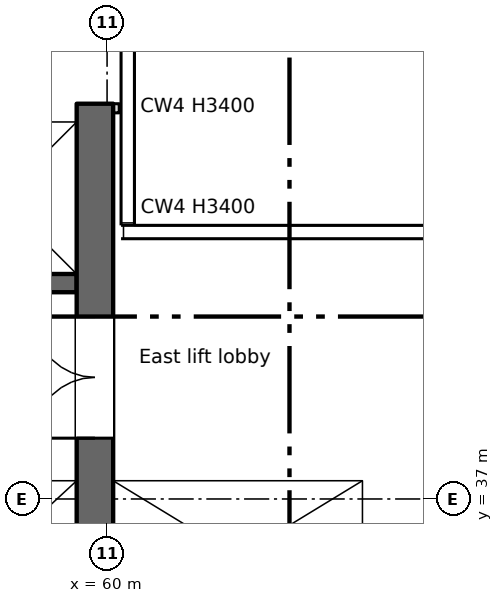
"""IFC4 building model, lengths in metres.
Left out: names, types, materials, properties, quantities, classifications, styles, units other than length and angle.
Written with IfcOpenShell. Run it as: python <this file> out.ifc"""

import sys

from ifc_helpers import new_model, si_unit, direction, frame, frame_2d, origin, place, context, subcontext, project, spatial, rectangle, extrude, element, fill, save


model = new_model("IFC4")
c1 = context("Model", 3, precision=1e-05, world=origin(), true_north=direction((0.0, 1.0)))
c2 = subcontext(c1, "Body", "Model", "MODEL_VIEW")
j1 = project(units=[si_unit("LENGTHUNIT", "METRE"), si_unit("PLANEANGLEUNIT", "RADIAN")], contexts=[c1])
p1 = place(None, origin())
s1 = spatial("IfcSite", under=j1, at=p1, CompositionType="ELEMENT")
p2 = place(p1, origin())
s2 = spatial("IfcBuilding", under=s1, at=p2, CompositionType="ELEMENT")
p3 = place(p2, frame((0.0, 0.0, 258.35)))
s3 = spatial("IfcBuildingStorey", under=s2, at=p3, CompositionType="ELEMENT", Elevation=258.35)
p4 = place(p3, frame((64.35, 34.8, 0.0), z_axis=(0.0, 0.0, 1.0), x_axis=(0.0, 1.0, 0.0)))
e1 = element("IfcWall", 1, at=p4, inside=s3, PredefinedType="SHEAR", context=c2, shape_type="SweptSolid", body=[
    extrude(rectangle(XDim=6.45, YDim=0.3, at=frame_2d((3.225, 0.0))), origin(), (0.0, 0.0, 1.0), 3.4),
])
p5 = place(p3, frame((59.8, 28.4, 0.0), z_axis=(0.0, 0.0, 1.0), x_axis=(0.0, 1.0, 0.0)))
e2 = element("IfcWall", 2, at=p5, inside=s3, PredefinedType="SHEAR", context=c2, shape_type="SweptSolid", body=[
    extrude(rectangle(XDim=15.1, YDim=0.6, at=frame_2d((7.55, 0.0))), origin(), (0.0, 0.0, 1.0), 3.4),
])
p6 = place(p5, frame((9.6, 0.0, 0.0)))
e3 = element("IfcOpeningElement", 3, at=p6, cuts=e2, PredefinedType="OPENING", context=c2, shape_type="SweptSolid", body=[
    extrude(rectangle(XDim=2.0, YDim=2.1, at=frame_2d((1.0, 1.05))), frame((0.0, 0.31, 0.0), z_axis=(0.0, -1.0, 0.0), x_axis=(1.0, 0.0, 0.0)), (0.0, 0.0, 1.0), 0.62),
])
p7 = place(p3, frame((47.3, 37.45, 0.0), z_axis=(0.0, 0.0, 1.0), x_axis=(1.0, 0.0, 0.0)))
e4 = element("IfcWall", 4, at=p7, inside=s3, PredefinedType="SHEAR", context=c2, shape_type="SweptSolid", body=[
    extrude(rectangle(XDim=12.2, YDim=0.3, at=frame_2d((6.1, 0.0))), origin(), (0.0, 0.0, 1.0), 3.4),
])
p8 = place(p7, frame((4.3, 0.0, 0.0)))
e5 = element("IfcOpeningElement", 5, at=p8, cuts=e4, PredefinedType="OPENING", context=c2, shape_type="SweptSolid", body=[
    extrude(rectangle(XDim=1.1, YDim=2.1, at=frame_2d((0.55, 1.05))), frame((0.0, 0.16, 0.0), z_axis=(0.0, -1.0, 0.0), x_axis=(1.0, 0.0, 0.0)), (0.0, 0.0, 1.0), 0.32),
])
p9 = place(p7, frame((7.3, 0.0, 0.0)))
e6 = element("IfcOpeningElement", 6, at=p9, cuts=e4, PredefinedType="OPENING", context=c2, shape_type="SweptSolid", body=[
    extrude(rectangle(XDim=1.1, YDim=2.1, at=frame_2d((0.55, 1.05))), frame((0.0, 0.16, 0.0), z_axis=(0.0, -1.0, 0.0), x_axis=(1.0, 0.0, 0.0)), (0.0, 0.0, 1.0), 0.32),
])
p10 = place(p7, frame((10.3, 0.0, 0.0)))
e7 = element("IfcOpeningElement", 7, at=p10, cuts=e4, PredefinedType="OPENING", context=c2, shape_type="SweptSolid", body=[
    extrude(rectangle(XDim=1.1, YDim=2.1, at=frame_2d((0.55, 1.05))), frame((0.0, 0.16, 0.0), z_axis=(0.0, -1.0, 0.0), x_axis=(1.0, 0.0, 0.0)), (0.0, 0.0, 1.0), 0.32),
])
p11 = place(p3, frame((60.1, 37.45, 0.0), z_axis=(0.0, 0.0, 1.0), x_axis=(1.0, 0.0, 0.0)))
e8 = element("IfcWall", 8, at=p11, inside=s3, PredefinedType="SHEAR", context=c2, shape_type="SweptSolid", body=[
    extrude(rectangle(XDim=4.1, YDim=0.3, at=frame_2d((2.05, 0.0))), origin(), (0.0, 0.0, 1.0), 3.4),
])
p12 = place(p11, frame((1.5, 0.0, 0.0)))
e9 = element("IfcOpeningElement", 9, at=p12, cuts=e8, PredefinedType="OPENING", context=c2, shape_type="SweptSolid", body=[
    extrude(rectangle(XDim=1.1, YDim=2.1, at=frame_2d((0.55, 1.05))), frame((0.0, 0.16, 0.0), z_axis=(0.0, -1.0, 0.0), x_axis=(1.0, 0.0, 0.0)), (0.0, 0.0, 1.0), 0.32),
])
p13 = place(p3, frame((18.5, 40.55, 0.0), z_axis=(0.0, 0.0, 1.0), x_axis=(1.0, 0.0, 0.0)))
e10 = element("IfcWall", 10, at=p13, inside=s3, PredefinedType="SHEAR", context=c2, shape_type="SweptSolid", body=[
    extrude(rectangle(XDim=41.0, YDim=0.3, at=frame_2d((20.5, 0.0))), origin(), (0.0, 0.0, 1.0), 3.4),
])
p14 = place(p13, frame((2.15, 0.0, 0.0)))
e11 = element("IfcOpeningElement", 11, at=p14, cuts=e10, PredefinedType="OPENING", context=c2, shape_type="SweptSolid", body=[
    extrude(rectangle(XDim=0.9, YDim=2.1, at=frame_2d((0.45, 1.05))), frame((0.0, 0.16, 0.0), z_axis=(0.0, -1.0, 0.0), x_axis=(1.0, 0.0, 0.0)), (0.0, 0.0, 1.0), 0.32),
])
p15 = place(p13, frame((15.9, 0.0, 0.0)))
e12 = element("IfcOpeningElement", 12, at=p15, cuts=e10, PredefinedType="OPENING", context=c2, shape_type="SweptSolid", body=[
    extrude(rectangle(XDim=0.9, YDim=2.1, at=frame_2d((0.45, 1.05))), frame((0.0, 0.16, 0.0), z_axis=(0.0, -1.0, 0.0), x_axis=(1.0, 0.0, 0.0)), (0.0, 0.0, 1.0), 0.32),
])
p16 = place(p13, frame((21.4, 0.0, 0.0)))
e13 = element("IfcOpeningElement", 13, at=p16, cuts=e10, PredefinedType="OPENING", context=c2, shape_type="SweptSolid", body=[
    extrude(rectangle(XDim=0.9, YDim=2.1, at=frame_2d((0.45, 1.05))), frame((0.0, 0.16, 0.0), z_axis=(0.0, -1.0, 0.0), x_axis=(1.0, 0.0, 0.0)), (0.0, 0.0, 1.0), 0.32),
])
p17 = place(p13, frame((26.9, 0.0, 0.0)))
e14 = element("IfcOpeningElement", 14, at=p17, cuts=e10, PredefinedType="OPENING", context=c2, shape_type="SweptSolid", body=[
    extrude(rectangle(XDim=0.9, YDim=2.1, at=frame_2d((0.45, 1.05))), frame((0.0, 0.16, 0.0), z_axis=(0.0, -1.0, 0.0), x_axis=(1.0, 0.0, 0.0)), (0.0, 0.0, 1.0), 0.32),
])
p18 = place(p13, frame((6.175, 0.0, 0.0)))
e15 = element("IfcOpeningElement", 15, at=p18, cuts=e10, PredefinedType="OPENING", context=c2, shape_type="SweptSolid", body=[
    extrude(rectangle(XDim=1.1, YDim=2.1, at=frame_2d((0.55, 1.05))), frame((0.0, 0.16, 0.0), z_axis=(0.0, -1.0, 0.0), x_axis=(1.0, 0.0, 0.0)), (0.0, 0.0, 1.0), 0.32),
])
p19 = place(p13, frame((8.925, 0.0, 0.0)))
e16 = element("IfcOpeningElement", 16, at=p19, cuts=e10, PredefinedType="OPENING", context=c2, shape_type="SweptSolid", body=[
    extrude(rectangle(XDim=1.1, YDim=2.1, at=frame_2d((0.55, 1.05))), frame((0.0, 0.16, 0.0), z_axis=(0.0, -1.0, 0.0), x_axis=(1.0, 0.0, 0.0)), (0.0, 0.0, 1.0), 0.32),
])
p20 = place(p13, frame((11.675, 0.0, 0.0)))
e17 = element("IfcOpeningElement", 17, at=p20, cuts=e10, PredefinedType="OPENING", context=c2, shape_type="SweptSolid", body=[
    extrude(rectangle(XDim=1.1, YDim=2.1, at=frame_2d((0.55, 1.05))), frame((0.0, 0.16, 0.0), z_axis=(0.0, -1.0, 0.0), x_axis=(1.0, 0.0, 0.0)), (0.0, 0.0, 1.0), 0.32),
])
p21 = place(p13, frame((30.925, 0.0, 0.0)))
e18 = element("IfcOpeningElement", 18, at=p21, cuts=e10, PredefinedType="OPENING", context=c2, shape_type="SweptSolid", body=[
    extrude(rectangle(XDim=1.1, YDim=2.1, at=frame_2d((0.55, 1.05))), frame((0.0, 0.16, 0.0), z_axis=(0.0, -1.0, 0.0), x_axis=(1.0, 0.0, 0.0)), (0.0, 0.0, 1.0), 0.32),
])
p22 = place(p13, frame((33.675, 0.0, 0.0)))
e19 = element("IfcOpeningElement", 19, at=p22, cuts=e10, PredefinedType="OPENING", context=c2, shape_type="SweptSolid", body=[
    extrude(rectangle(XDim=1.1, YDim=2.1, at=frame_2d((0.55, 1.05))), frame((0.0, 0.16, 0.0), z_axis=(0.0, -1.0, 0.0), x_axis=(1.0, 0.0, 0.0)), (0.0, 0.0, 1.0), 0.32),
])
p23 = place(p13, frame((36.375, 0.0, 0.0)))
e20 = element("IfcOpeningElement", 20, at=p23, cuts=e10, PredefinedType="OPENING", context=c2, shape_type="SweptSolid", body=[
    extrude(rectangle(XDim=1.2, YDim=2.1, at=frame_2d((0.6, 1.05))), frame((0.0, 0.16, 0.0), z_axis=(0.0, -1.0, 0.0), x_axis=(1.0, 0.0, 0.0)), (0.0, 0.0, 1.0), 0.32),
])
p24 = place(p13, frame((39.15, 0.0, 0.0)))
e21 = element("IfcOpeningElement", 21, at=p24, cuts=e10, PredefinedType="OPENING", context=c2, shape_type="SweptSolid", body=[
    extrude(rectangle(XDim=1.2, YDim=2.1, at=frame_2d((0.6, 1.05))), frame((0.0, 0.16, 0.0), z_axis=(0.0, -1.0, 0.0), x_axis=(1.0, 0.0, 0.0)), (0.0, 0.0, 1.0), 0.32),
])
p25 = place(p3, frame((18.5, 43.35, 0.0), z_axis=(0.0, 0.0, 1.0), x_axis=(1.0, 0.0, 0.0)))
e22 = element("IfcWall", 22, at=p25, inside=s3, PredefinedType="SHEAR", context=c2, shape_type="SweptSolid", body=[
    extrude(rectangle(XDim=41.0, YDim=0.3, at=frame_2d((20.5, 0.0))), origin(), (0.0, 0.0, 1.0), 3.4),
])
p26 = place(p3, frame((60.15, 43.35, 0.0), z_axis=(0.0, 0.0, 1.0), x_axis=(0.0, 1.0, 0.0)))
e23 = element("IfcWall", 23, at=p26, inside=s3, PredefinedType="PARTITIONING", context=c2, shape_type="SweptSolid", body=[
    extrude(rectangle(XDim=0.15, YDim=0.1, at=frame_2d((0.075, 0.0))), origin(), (0.0, 0.0, 1.0), 3.4),
])
p27 = place(p12, origin())
e24 = element("IfcDoor", 24, at=p27, inside=s3, OperationType="SLIDING_TO_LEFT", PredefinedType="DOOR", context=c2, shape_type="SweptSolid", body=[
    extrude(rectangle(XDim=1.1, YDim=2.1, at=frame_2d((0.55, 1.05))), frame((0.0, 0.025, 0.0), z_axis=(0.0, -1.0, 0.0), x_axis=(1.0, 0.0, 0.0)), (0.0, 0.0, 1.0), 0.05),
])
fill(e9, e24)
p28 = place(p6, origin())
e25 = element("IfcDoor", 25, at=p28, inside=s3, OperationType="DOUBLE_DOOR_SINGLE_SWING", PredefinedType="DOOR", context=c2, shape_type="SweptSolid", body=[
    extrude(rectangle(XDim=2.0, YDim=2.1, at=frame_2d((1.0, 1.05))), frame((0.0, 0.025, 0.0), z_axis=(0.0, -1.0, 0.0), x_axis=(1.0, 0.0, 0.0)), (0.0, 0.0, 1.0), 0.05),
])
fill(e3, e25)
save(model, sys.argv[1])
